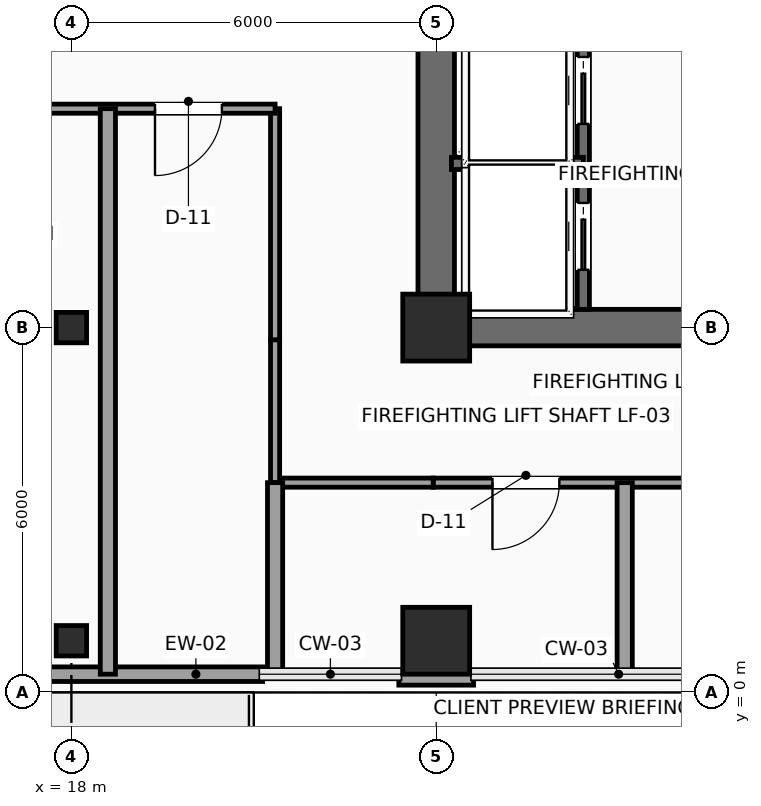
"""IFC4 building model, lengths in metres.
Left out: names, types, materials, properties, quantities, classifications, styles, units other than length and angle.
Written with IfcOpenShell. Run it as: python <this file> out.ifc"""

import sys

from ifc_helpers import new_model, si_unit, direction, frame, frame_2d, origin, origin_2d, place, context, subcontext, project, spatial, rectangle, hollow_rectangle, extrude, element, fill, save


model = new_model("IFC4")
c1 = context("Model", 3, precision=1e-05, world=origin(), true_north=direction((0.0, 1.0)))
c2 = subcontext(c1, "Body", "Model", "MODEL_VIEW")
j1 = project(units=[si_unit("LENGTHUNIT", "METRE"), si_unit("PLANEANGLEUNIT", "RADIAN")], contexts=[c1])
p1 = place(None, origin())
s1 = spatial("IfcSite", under=j1, at=p1, CompositionType="ELEMENT")
p2 = place(p1, origin())
s2 = spatial("IfcBuilding", under=s1, at=p2, CompositionType="ELEMENT")
p3 = place(p2, frame((0.0, 0.0, 126.9)))
s3 = spatial("IfcBuildingStorey", under=s2, at=p3, CompositionType="ELEMENT", Elevation=126.9)
p4 = place(p3, frame((24.0, 6.0, 0.0), z_axis=(0.0, 0.0, 1.0), x_axis=(1.0, 0.0, 0.0)))
e1 = element("IfcColumn", 1, at=p4, inside=s3, PredefinedType="COLUMN", context=c2, shape_type="SweptSolid", body=[
    extrude(rectangle(XDim=1.1, YDim=1.1, at=origin_2d()), origin(), (0.0, 0.0, 1.0), 3.75),
])
for number, where, z_axis, x_axis in (
    (2, (18.0, 0.85, 0.0), (0.0, 0.0, 1.0), (1.0, 0.0, 0.0)),
    (3, (18.0, 6.0, 0.0), (0.0, 0.0, 1.0), (1.0, 0.0, 0.0)),
):
    element("IfcColumn", number, at=place(p3, frame(where, z_axis=z_axis, x_axis=x_axis)), inside=s3, PredefinedType="COLUMN", context=c2, shape_type="SweptSolid", body=[
        extrude(hollow_rectangle(XDim=0.5, YDim=0.5, WallThickness=0.025, InnerFilletRadius=0.025, OuterFilletRadius=0.04, at=origin_2d()), origin(), (0.0, 0.0, 1.0), 3.75),
    ])
p5 = place(p3, frame((24.0, 0.85, 0.0), z_axis=(0.0, 0.0, 1.0), x_axis=(1.0, 0.0, 0.0)))
e4 = element("IfcColumn", 4, at=p5, inside=s3, PredefinedType="COLUMN", context=c2, shape_type="SweptSolid", body=[
    extrude(rectangle(XDim=1.1, YDim=1.1, at=origin_2d()), origin(), (0.0, 0.0, 1.0), 3.75),
])
p6 = place(p3, frame((21.145, 0.3, 0.0), z_axis=(0.0, 0.0, 1.0), x_axis=(-1.0, 0.0, 0.0)))
e5 = element("IfcWall", 5, at=p6, inside=s3, PredefinedType="SOLIDWALL", context=c2, shape_type="SweptSolid", body=[
    extrude(rectangle(XDim=9.29, YDim=0.24, at=frame_2d((4.645, 0.0))), origin(), (0.0, 0.0, 1.0), 3.525),
])
p7 = place(p6, frame((3.945, 0.0, 0.0)))
e6 = element("IfcOpeningElement", 6, at=p7, cuts=e5, PredefinedType="OPENING", context=c2, shape_type="SweptSolid", body=[
    extrude(rectangle(XDim=1.05, YDim=2.2, at=frame_2d((0.525, 1.1))), frame((0.0, 0.13, 0.0), z_axis=(0.0, -1.0, 0.0), x_axis=(1.0, 0.0, 0.0)), (0.0, 0.0, 1.0), 0.26),
])
p8 = place(p6, frame((5.345, 0.0, 0.85)))
e7 = element("IfcOpeningElement", 7, at=p8, cuts=e5, PredefinedType="OPENING", context=c2, shape_type="SweptSolid", body=[
    extrude(rectangle(XDim=1.8, YDim=2.1, at=frame_2d((0.9, 1.05))), frame((0.0, 0.13, 0.0), z_axis=(0.0, -1.0, 0.0), x_axis=(1.0, 0.0, 0.0)), (0.0, 0.0, 1.0), 0.26),
])
p9 = place(p3, frame((24.615, 0.24, 0.0), z_axis=(0.0, 0.0, 1.0), x_axis=(-1.0, 0.0, 0.0)))
e8 = element("IfcWall", 8, at=p9, inside=s3, PredefinedType="SOLIDWALL", context=c2, shape_type="SweptSolid", body=[
    extrude(rectangle(XDim=1.23, YDim=0.24, at=frame_2d((0.615, 0.0))), origin(), (0.0, 0.0, 1.0), 3.525),
])
p10 = place(p3, frame((24.0, 6.0, 0.0), z_axis=(0.0, 0.0, 1.0), x_axis=(1.0, 0.0, 0.0)))
e9 = element("IfcWall", 9, at=p10, inside=s3, PredefinedType="SHEAR", context=c2, shape_type="SweptSolid", body=[
    extrude(rectangle(XDim=9.6, YDim=0.6, at=frame_2d((4.8, 0.0))), origin(), (0.0, 0.0, 1.0), 3.525),
])
p11 = place(p3, frame((24.0, 6.0, 0.0), z_axis=(0.0, 0.0, 1.0), x_axis=(0.0, 1.0, 0.0)))
e10 = element("IfcWall", 10, at=p11, inside=s3, PredefinedType="SHEAR", context=c2, shape_type="SweptSolid", body=[
    extrude(rectangle(XDim=12.0, YDim=0.6, at=frame_2d((6.0, 0.0))), origin(), (0.0, 0.0, 1.0), 3.525),
])
p12 = place(p11, frame((7.15, 0.0, 0.0)))
e11 = element("IfcOpeningElement", 11, at=p12, cuts=e10, PredefinedType="OPENING", context=c2, shape_type="SweptSolid", body=[
    extrude(rectangle(XDim=1.6, YDim=2.3, at=frame_2d((0.8, 1.15))), frame((0.0, 0.31, 0.0), z_axis=(0.0, -1.0, 0.0), x_axis=(1.0, 0.0, 0.0)), (0.0, 0.0, 1.0), 0.62),
])
p13 = place(p3, frame((26.42, 6.3, 0.0), z_axis=(0.0, 0.0, 1.0), x_axis=(0.0, 1.0, 0.0)))
e12 = element("IfcWall", 12, at=p13, inside=s3, PredefinedType="SHEAR", context=c2, shape_type="SweptSolid", body=[
    extrude(rectangle(XDim=4.95, YDim=0.2, at=frame_2d((2.475, 0.0))), origin(), (0.0, 0.0, 1.0), 3.525),
])
p14 = place(p13, frame((0.65, 0.0, 0.0)))
e13 = element("IfcOpeningElement", 13, at=p14, cuts=e12, PredefinedType="OPENING", context=c2, shape_type="SweptSolid", body=[
    extrude(rectangle(XDim=1.1, YDim=2.2, at=frame_2d((0.55, 1.1))), frame((0.0, 0.11, 0.0), z_axis=(0.0, -1.0, 0.0), x_axis=(1.0, 0.0, 0.0)), (0.0, 0.0, 1.0), 0.22),
])
p15 = place(p13, frame((3.05, 0.0, 0.0)))
e14 = element("IfcOpeningElement", 14, at=p15, cuts=e12, PredefinedType="OPENING", context=c2, shape_type="SweptSolid", body=[
    extrude(rectangle(XDim=1.1, YDim=2.2, at=frame_2d((0.55, 1.1))), frame((0.0, 0.11, 0.0), z_axis=(0.0, -1.0, 0.0), x_axis=(1.0, 0.0, 0.0)), (0.0, 0.0, 1.0), 0.22),
])
p16 = place(p3, frame((24.25, 8.7, 0.0), z_axis=(0.0, 0.0, 1.0), x_axis=(1.0, 0.0, 0.0)))
e15 = element("IfcWall", 15, at=p16, inside=s3, PredefinedType="SHEAR", context=c2, shape_type="SweptSolid", body=[
    extrude(rectangle(XDim=2.17, YDim=0.2, at=frame_2d((1.085, 0.0))), origin(), (0.0, 0.0, 1.0), 3.525),
])
p17 = place(p3, frame((36.15, 3.45, 0.0), z_axis=(0.0, 0.0, 1.0), x_axis=(-1.0, 0.0, 0.0)))
e16 = element("IfcWall", 16, at=p17, inside=s3, PredefinedType="PARTITIONING", context=c2, shape_type="SweptSolid", body=[
    extrude(rectangle(XDim=12.2, YDim=0.15, at=frame_2d((6.1, 0.0))), origin(), (0.0, 0.0, 1.0), 3.067),
])
p18 = place(p17, frame((10.125, 0.0, 0.0)))
e17 = element("IfcOpeningElement", 17, at=p18, cuts=e16, PredefinedType="OPENING", context=c2, shape_type="SweptSolid", body=[
    extrude(rectangle(XDim=1.1, YDim=2.25, at=frame_2d((0.55, 1.125))), frame((0.0, 0.085, 0.0), z_axis=(0.0, -1.0, 0.0), x_axis=(1.0, 0.0, 0.0)), (0.0, 0.0, 1.0), 0.17),
])
p19 = place(p17, frame((5.7, 0.0, 0.0)))
e18 = element("IfcOpeningElement", 18, at=p19, cuts=e16, PredefinedType="OPENING", context=c2, shape_type="SweptSolid", body=[
    extrude(rectangle(XDim=1.1, YDim=2.25, at=frame_2d((0.55, 1.125))), frame((0.0, 0.085, 0.0), z_axis=(0.0, -1.0, 0.0), x_axis=(1.0, 0.0, 0.0)), (0.0, 0.0, 1.0), 0.17),
])
p20 = place(p3, frame((23.95, 3.45, 0.0), z_axis=(0.0, 0.0, 1.0), x_axis=(-1.0, 0.0, 0.0)))
e19 = element("IfcWall", 19, at=p20, inside=s3, PredefinedType="PARTITIONING", context=c2, shape_type="SweptSolid", body=[
    extrude(rectangle(XDim=2.6, YDim=0.15, at=frame_2d((1.3, 0.0))), origin(), (0.0, 0.0, 1.0), 3.067),
])
p21 = place(p3, frame((21.35, 3.45, 0.0), z_axis=(0.0, 0.0, 1.0), x_axis=(0.0, 1.0, 0.0)))
e20 = element("IfcWall", 20, at=p21, inside=s3, PredefinedType="PARTITIONING", context=c2, shape_type="SweptSolid", body=[
    extrude(rectangle(XDim=2.35, YDim=0.15, at=frame_2d((1.175, 0.0))), origin(), (0.0, 0.0, 1.0), 3.525),
])
p22 = place(p3, frame((21.35, 5.8, 0.0), z_axis=(0.0, 0.0, 1.0), x_axis=(0.0, 1.0, 0.0)))
e21 = element("IfcWall", 21, at=p22, inside=s3, PredefinedType="PARTITIONING", context=c2, shape_type="SweptSolid", body=[
    extrude(rectangle(XDim=3.8, YDim=0.15, at=frame_2d((1.9, 0.0))), origin(), (0.0, 0.0, 1.0), 3.525),
])
p23 = place(p3, frame((21.35, 9.6, 0.0), z_axis=(0.0, 0.0, 1.0), x_axis=(-1.0, 0.0, 0.0)))
e22 = element("IfcWall", 22, at=p23, inside=s3, PredefinedType="PARTITIONING", context=c2, shape_type="SweptSolid", body=[
    extrude(rectangle(XDim=18.15, YDim=0.15, at=frame_2d((9.075, 0.0))), origin(), (0.0, 0.0, 1.0), 3.525),
])
p24 = place(p23, frame((13.55, 0.0, 0.0)))
e23 = element("IfcOpeningElement", 23, at=p24, cuts=e22, PredefinedType="OPENING", context=c2, shape_type="SweptSolid", body=[
    extrude(rectangle(XDim=1.1, YDim=2.25, at=frame_2d((0.55, 1.125))), frame((0.0, 0.085, 0.0), z_axis=(0.0, -1.0, 0.0), x_axis=(1.0, 0.0, 0.0)), (0.0, 0.0, 1.0), 0.17),
])
p25 = place(p23, frame((5.85, 0.0, 0.0)))
e24 = element("IfcOpeningElement", 24, at=p25, cuts=e22, PredefinedType="OPENING", context=c2, shape_type="SweptSolid", body=[
    extrude(rectangle(XDim=1.1, YDim=2.25, at=frame_2d((0.55, 1.125))), frame((0.0, 0.085, 0.0), z_axis=(0.0, -1.0, 0.0), x_axis=(1.0, 0.0, 0.0)), (0.0, 0.0, 1.0), 0.17),
])
p26 = place(p23, frame((0.875, 0.0, 0.0)))
e25 = element("IfcOpeningElement", 25, at=p26, cuts=e22, PredefinedType="OPENING", context=c2, shape_type="SweptSolid", body=[
    extrude(rectangle(XDim=1.1, YDim=2.25, at=frame_2d((0.55, 1.125))), frame((0.0, 0.085, 0.0), z_axis=(0.0, -1.0, 0.0), x_axis=(1.0, 0.0, 0.0)), (0.0, 0.0, 1.0), 0.17),
])
for number, where, z_axis, x_axis in (
    (26, (21.35, 0.3, 0.0), (0.0, 0.0, 1.0), (0.0, 1.0, 0.0)),
    (27, (27.1, 0.3, 0.0), (0.0, 0.0, 1.0), (0.0, 1.0, 0.0)),
):
    element("IfcWall", number, at=place(p3, frame(where, z_axis=z_axis, x_axis=x_axis)), inside=s3, PredefinedType="PARTITIONING", context=c2, shape_type="SweptSolid", body=[
        extrude(rectangle(XDim=3.15, YDim=0.25, at=frame_2d((1.575, 0.0))), origin(), (0.0, 0.0, 1.0), 3.525),
    ])
p27 = place(p3, frame((18.6, 0.3, 0.0), z_axis=(0.0, 0.0, 1.0), x_axis=(0.0, 1.0, 0.0)))
e28 = element("IfcWall", 28, at=p27, inside=s3, PredefinedType="PARTITIONING", context=c2, shape_type="SweptSolid", body=[
    extrude(rectangle(XDim=9.3, YDim=0.25, at=frame_2d((4.65, 0.0))), origin(), (0.0, 0.0, 1.0), 3.525),
])
p28 = place(p14, origin())
e29 = element("IfcDoor", 29, at=p28, inside=s3, OperationType="SLIDING_TO_LEFT", PredefinedType="DOOR", context=c2, shape_type="SweptSolid", body=[
    extrude(rectangle(XDim=1.1, YDim=2.2, at=frame_2d((0.55, 1.1))), frame((0.0, 0.025, 0.0), z_axis=(0.0, -1.0, 0.0), x_axis=(1.0, 0.0, 0.0)), (0.0, 0.0, 1.0), 0.05),
])
fill(e13, e29)
p29 = place(p15, origin())
e30 = element("IfcDoor", 30, at=p29, inside=s3, OperationType="SLIDING_TO_LEFT", PredefinedType="DOOR", context=c2, shape_type="SweptSolid", body=[
    extrude(rectangle(XDim=1.1, YDim=2.2, at=frame_2d((0.55, 1.1))), frame((0.0, 0.025, 0.0), z_axis=(0.0, -1.0, 0.0), x_axis=(1.0, 0.0, 0.0)), (0.0, 0.0, 1.0), 0.05),
])
fill(e14, e30)
p30 = place(p18, origin())
e31 = element("IfcDoor", 31, at=p30, inside=s3, OperationType="SINGLE_SWING_RIGHT", PredefinedType="DOOR", context=c2, shape_type="SweptSolid", body=[
    extrude(rectangle(XDim=1.1, YDim=2.25, at=frame_2d((0.55, 1.125))), frame((0.0, 0.025, 0.0), z_axis=(0.0, -1.0, 0.0), x_axis=(1.0, 0.0, 0.0)), (0.0, 0.0, 1.0), 0.05),
])
fill(e17, e31)
p31 = place(p26, origin())
e32 = element("IfcDoor", 32, at=p31, inside=s3, OperationType="SINGLE_SWING_RIGHT", PredefinedType="DOOR", context=c2, shape_type="SweptSolid", body=[
    extrude(rectangle(XDim=1.1, YDim=2.25, at=frame_2d((0.55, 1.125))), frame((0.0, 0.025, 0.0), z_axis=(0.0, -1.0, 0.0), x_axis=(1.0, 0.0, 0.0)), (0.0, 0.0, 1.0), 0.05),
])
fill(e25, e32)
save(model, sys.argv[1])
